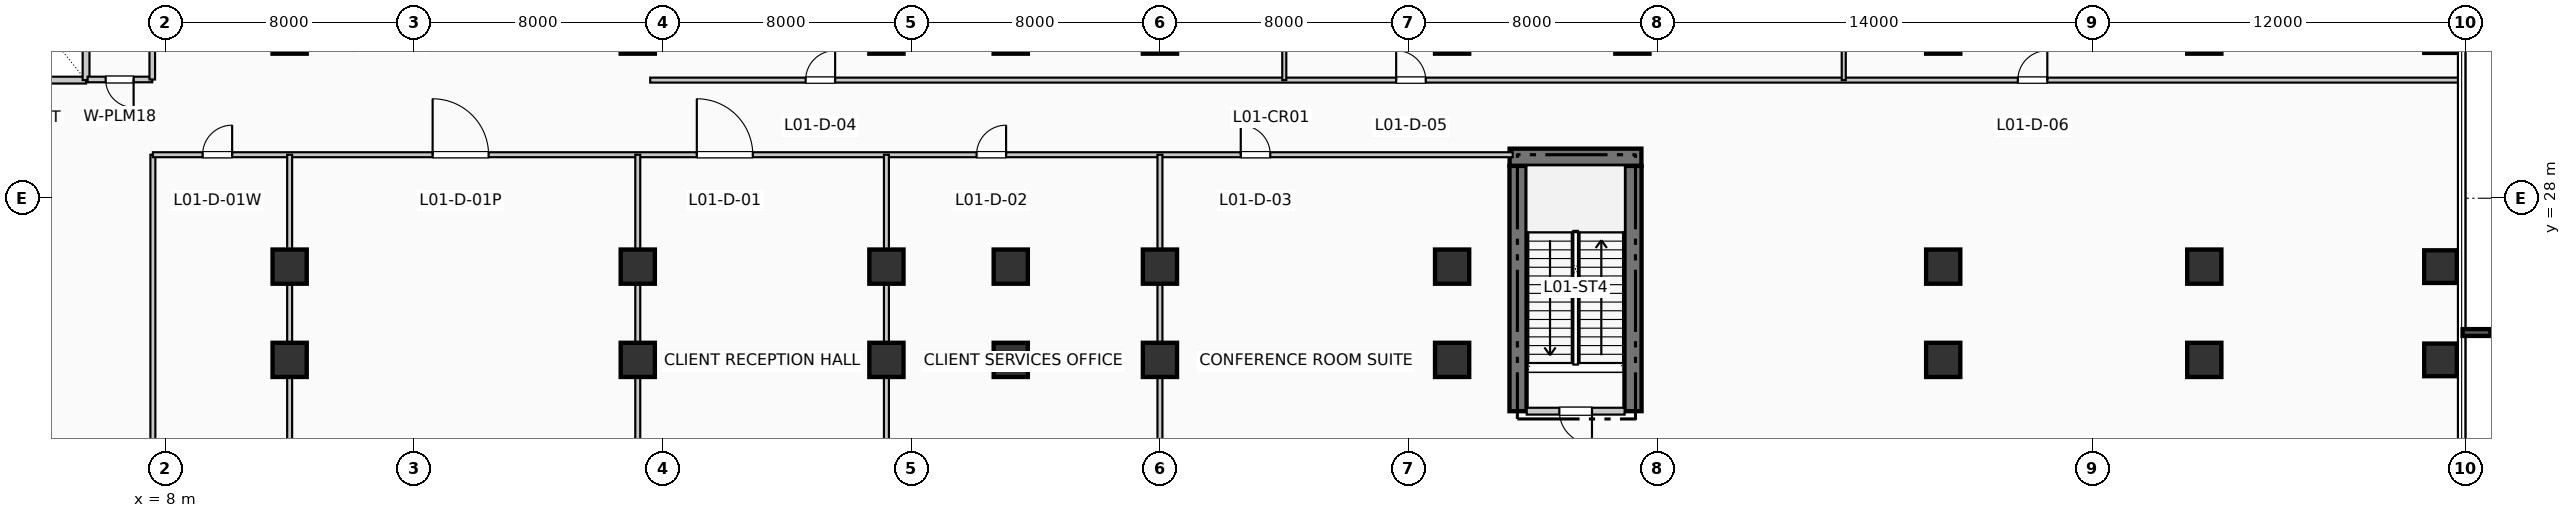
"""IFC4 building model, lengths in metres.
Left out: names, types, materials, properties, quantities, classifications, styles, units other than length and angle.
Written with IfcOpenShell. Run it as: python <this file> out.ifc"""

import sys

from ifc_helpers import new_model, si_unit, direction, frame, frame_2d, origin, origin_2d, place, context, subcontext, project, spatial, rectangle, extrude, element, fill, save


model = new_model("IFC4")
c1 = context("Model", 3, precision=1e-05, world=origin(), true_north=direction((0.0, 1.0)))
c2 = subcontext(c1, "Body", "Model", "MODEL_VIEW")
j1 = project(units=[si_unit("LENGTHUNIT", "METRE"), si_unit("PLANEANGLEUNIT", "RADIAN")], contexts=[c1])
p1 = place(None, origin())
s1 = spatial("IfcSite", under=j1, at=p1, CompositionType="ELEMENT")
p2 = place(p1, origin())
s2 = spatial("IfcBuilding", under=s1, at=p2, CompositionType="ELEMENT")
p3 = place(p2, frame((0.0, 0.0, 5.94)))
s3 = spatial("IfcBuildingStorey", under=s2, at=p3, CompositionType="ELEMENT", Elevation=5.94)
for number, where, z_axis, x_axis in (
    (1, (51.52, 21.15, 0.0), (0.0, 0.0, 1.0), (0.0, 1.0, 0.0)),
    (2, (55.22, 21.15, 0.0), (0.0, 0.0, 1.0), (0.0, 1.0, 0.0)),
):
    element("IfcWall", number, at=place(p3, frame(where, z_axis=z_axis, x_axis=x_axis)), inside=s3, PredefinedType="SHEAR", context=c2, shape_type="SweptSolid", body=[
        extrude(rectangle(XDim=7.89, YDim=0.55, at=frame_2d((3.945, 0.0))), origin(), (0.0, 0.0, 1.0), 5.28),
    ])
p4 = place(p3, frame((51.25, 29.32, 0.0), z_axis=(0.0, 0.0, 1.0), x_axis=(1.0, 0.0, 0.0)))
e3 = element("IfcWall", 3, at=p4, inside=s3, PredefinedType="SHEAR", context=c2, shape_type="SweptSolid", body=[
    extrude(rectangle(XDim=4.24, YDim=0.55, at=frame_2d((2.12, 0.0))), origin(), (0.0, 0.0, 1.0), 5.28),
])
for number, where, z_axis, x_axis in (
    (4, (12.0, 22.8, 0.0), (0.0, 0.0, 1.0), (1.0, 0.0, 0.0)),
    (5, (12.0, 25.8, 0.0), (0.0, 0.0, 1.0), (1.0, 0.0, 0.0)),
    (6, (12.0, 33.2, 0.0), (0.0, 0.0, 1.0), (1.0, 0.0, 0.0)),
    (7, (23.2, 22.8, 0.0), (0.0, 0.0, 1.0), (1.0, 0.0, 0.0)),
    (8, (23.2, 25.8, 0.0), (0.0, 0.0, 1.0), (1.0, 0.0, 0.0)),
    (9, (23.2, 33.2, 0.0), (0.0, 0.0, 1.0), (1.0, 0.0, 0.0)),
    (10, (31.2, 22.8, 0.0), (0.0, 0.0, 1.0), (1.0, 0.0, 0.0)),
    (11, (31.2, 25.8, 0.0), (0.0, 0.0, 1.0), (1.0, 0.0, 0.0)),
    (12, (31.2, 33.2, 0.0), (0.0, 0.0, 1.0), (1.0, 0.0, 0.0)),
    (13, (35.2, 22.8, 0.0), (0.0, 0.0, 1.0), (1.0, 0.0, 0.0)),
    (14, (35.2, 25.8, 0.0), (0.0, 0.0, 1.0), (1.0, 0.0, 0.0)),
    (15, (35.2, 33.2, 0.0), (0.0, 0.0, 1.0), (1.0, 0.0, 0.0)),
    (16, (40.0, 22.8, 0.0), (0.0, 0.0, 1.0), (1.0, 0.0, 0.0)),
    (17, (40.0, 25.8, 0.0), (0.0, 0.0, 1.0), (1.0, 0.0, 0.0)),
    (18, (40.0, 33.2, 0.0), (0.0, 0.0, 1.0), (1.0, 0.0, 0.0)),
    (19, (49.4, 22.8, 0.0), (0.0, 0.0, 1.0), (1.0, 0.0, 0.0)),
    (20, (49.4, 25.8, 0.0), (0.0, 0.0, 1.0), (1.0, 0.0, 0.0)),
    (21, (49.4, 33.2, 0.0), (0.0, 0.0, 1.0), (1.0, 0.0, 0.0)),
    (22, (55.2, 33.2, 0.0), (0.0, 0.0, 1.0), (1.0, 0.0, 0.0)),
    (23, (65.2, 22.8, 0.0), (0.0, 0.0, 1.0), (1.0, 0.0, 0.0)),
    (24, (65.2, 25.8, 0.0), (0.0, 0.0, 1.0), (1.0, 0.0, 0.0)),
    (25, (65.2, 33.2, 0.0), (0.0, 0.0, 1.0), (1.0, 0.0, 0.0)),
    (26, (73.6, 22.8, 0.0), (0.0, 0.0, 1.0), (1.0, 0.0, 0.0)),
    (27, (73.6, 25.8, 0.0), (0.0, 0.0, 1.0), (1.0, 0.0, 0.0)),
    (28, (73.6, 33.2, 0.0), (0.0, 0.0, 1.0), (1.0, 0.0, 0.0)),
):
    element("IfcColumn", number, at=place(p3, frame(where, z_axis=z_axis, x_axis=x_axis)), inside=s3, PredefinedType="COLUMN", context=c2, shape_type="SweptSolid", body=[
        extrude(rectangle(XDim=1.1, YDim=1.1, at=origin_2d()), origin(), (0.0, 0.0, 1.0), 5.28),
    ])
for number, where, z_axis, x_axis in (
    (29, (81.2, 22.8, 0.0), (0.0, 0.0, 1.0), (1.0, 0.0, 0.0)),
    (30, (81.2, 25.8, 0.0), (0.0, 0.0, 1.0), (1.0, 0.0, 0.0)),
    (31, (81.2, 33.2, 0.0), (0.0, 0.0, 1.0), (1.0, 0.0, 0.0)),
):
    element("IfcColumn", number, at=place(p3, frame(where, z_axis=z_axis, x_axis=x_axis)), inside=s3, PredefinedType="COLUMN", context=c2, shape_type="SweptSolid", body=[
        extrude(rectangle(XDim=1.05, YDim=1.05, at=origin_2d()), origin(), (0.0, 0.0, 1.0), 5.28),
    ])
p5 = place(p3, frame((1.55, 31.8, 0.0), z_axis=(0.0, 0.0, 1.0), x_axis=(1.0, 0.0, 0.0)))
e32 = element("IfcWall", 32, at=p5, inside=s3, PredefinedType="PARTITIONING", context=c2, shape_type="SweptSolid", body=[
    extrude(rectangle(XDim=3.9, YDim=0.22, at=frame_2d((1.95, 0.0))), origin(), (0.0, 0.0, 1.0), 4.96),
])
p6 = place(p3, frame((5.45, 31.8, 0.0), z_axis=(0.0, 0.0, 1.0), x_axis=(0.0, 1.0, 0.0)))
e33 = element("IfcWall", 33, at=p6, inside=s3, PredefinedType="PARTITIONING", context=c2, shape_type="SweptSolid", body=[
    extrude(rectangle(XDim=2.38, YDim=0.22, at=frame_2d((1.19, 0.0))), origin(), (0.0, 0.0, 1.0), 4.96),
])
p7 = place(p3, frame((5.5, 31.82, 0.0), z_axis=(0.0, 0.0, 1.0), x_axis=(1.0, 0.0, 0.0)))
e34 = element("IfcWall", 34, at=p7, inside=s3, PredefinedType="PLUMBINGWALL", context=c2, shape_type="SweptSolid", body=[
    extrude(rectangle(XDim=2.08, YDim=0.18, at=frame_2d((1.04, 0.0))), origin(), (0.0, 0.0, 1.0), 4.96),
])
p8 = place(p7, frame((1.48, 0.0, 0.0), z_axis=(0.0, 0.0, 1.0), x_axis=(-1.0, 0.0, 0.0)))
e35 = element("IfcOpeningElement", 35, at=p8, cuts=e34, PredefinedType="OPENING", context=c2, shape_type="SweptSolid", body=[
    extrude(rectangle(XDim=0.9, YDim=2.1, at=frame_2d((0.45, 1.05))), frame((0.0, 0.1, 0.0), z_axis=(0.0, -1.0, 0.0), x_axis=(1.0, 0.0, 0.0)), (0.0, 0.0, 1.0), 0.2),
])
p9 = place(p3, frame((7.58, 31.82, 0.0), z_axis=(0.0, 0.0, 1.0), x_axis=(0.0, 1.0, 0.0)))
e36 = element("IfcWall", 36, at=p9, inside=s3, PredefinedType="PLUMBINGWALL", context=c2, shape_type="SweptSolid", body=[
    extrude(rectangle(XDim=2.36, YDim=0.18, at=frame_2d((1.18, 0.0))), origin(), (0.0, 0.0, 1.0), 4.96),
])
p10 = place(p3, frame((51.8, 21.15, 0.0), z_axis=(0.0, 0.0, 1.0), x_axis=(1.0, 0.0, 0.0)))
e37 = element("IfcWall", 37, at=p10, inside=s3, PredefinedType="PARTITIONING", context=c2, shape_type="SweptSolid", body=[
    extrude(rectangle(XDim=3.15, YDim=0.22, at=frame_2d((1.575, 0.0))), origin(), (0.0, 0.0, 1.0), 4.96),
])
p11 = place(p10, frame((2.1, 0.0, 0.0), z_axis=(0.0, 0.0, 1.0), x_axis=(-1.0, 0.0, 0.0)))
e38 = element("IfcOpeningElement", 38, at=p11, cuts=e37, PredefinedType="OPENING", context=c2, shape_type="SweptSolid", body=[
    extrude(rectangle(XDim=1.05, YDim=2.15, at=frame_2d((0.525, 1.075))), frame((0.0, 0.12, 0.0), z_axis=(0.0, -1.0, 0.0), x_axis=(1.0, 0.0, 0.0)), (0.0, 0.0, 1.0), 0.24),
])
p12 = place(p3, frame((7.6, -1.81, 0.0), z_axis=(0.0, 0.0, 1.0), x_axis=(0.0, 1.0, 0.0)))
e39 = element("IfcWall", 39, at=p12, inside=s3, PredefinedType="PARTITIONING", context=c2, shape_type="SweptSolid", body=[
    extrude(rectangle(XDim=31.21, YDim=0.16, at=frame_2d((15.605, 0.0))), origin(), (0.0, 0.0, 1.0), 3.895),
])
p13 = place(p3, frame((7.6, 29.4, 0.0), z_axis=(0.0, 0.0, 1.0), x_axis=(1.0, 0.0, 0.0)))
e40 = element("IfcWall", 40, at=p13, inside=s3, PredefinedType="PARTITIONING", context=c2, shape_type="SweptSolid", body=[
    extrude(rectangle(XDim=43.75, YDim=0.16, at=frame_2d((21.875, 0.0))), origin(), (0.0, 0.0, 1.0), 4.615),
])
p14 = place(p13, frame((17.5, 0.0, 0.0)))
e41 = element("IfcOpeningElement", 41, at=p14, cuts=e40, PredefinedType="OPENING", context=c2, shape_type="SweptSolid", body=[
    extrude(rectangle(XDim=1.8, YDim=2.3, at=frame_2d((0.9, 1.15))), frame((0.0, 0.09, 0.0), z_axis=(0.0, -1.0, 0.0), x_axis=(1.0, 0.0, 0.0)), (0.0, 0.0, 1.0), 0.18),
])
p15 = place(p13, frame((1.6, 0.0, 0.0)))
e42 = element("IfcOpeningElement", 42, at=p15, cuts=e40, PredefinedType="OPENING", context=c2, shape_type="SweptSolid", body=[
    extrude(rectangle(XDim=0.95, YDim=2.15, at=frame_2d((0.475, 1.075))), frame((0.0, 0.09, 0.0), z_axis=(0.0, -1.0, 0.0), x_axis=(1.0, 0.0, 0.0)), (0.0, 0.0, 1.0), 0.18),
])
p16 = place(p13, frame((9.0, 0.0, 0.0)))
e43 = element("IfcOpeningElement", 43, at=p16, cuts=e40, PredefinedType="OPENING", context=c2, shape_type="SweptSolid", body=[
    extrude(rectangle(XDim=1.8, YDim=2.3, at=frame_2d((0.9, 1.15))), frame((0.0, 0.09, 0.0), z_axis=(0.0, -1.0, 0.0), x_axis=(1.0, 0.0, 0.0)), (0.0, 0.0, 1.0), 0.18),
])
p17 = place(p13, frame((26.5, 0.0, 0.0)))
e44 = element("IfcOpeningElement", 44, at=p17, cuts=e40, PredefinedType="OPENING", context=c2, shape_type="SweptSolid", body=[
    extrude(rectangle(XDim=0.95, YDim=2.15, at=frame_2d((0.475, 1.075))), frame((0.0, 0.09, 0.0), z_axis=(0.0, -1.0, 0.0), x_axis=(1.0, 0.0, 0.0)), (0.0, 0.0, 1.0), 0.18),
])
p18 = place(p13, frame((35.0, 0.0, 0.0)))
e45 = element("IfcOpeningElement", 45, at=p18, cuts=e40, PredefinedType="OPENING", context=c2, shape_type="SweptSolid", body=[
    extrude(rectangle(XDim=0.95, YDim=2.15, at=frame_2d((0.475, 1.075))), frame((0.0, 0.09, 0.0), z_axis=(0.0, -1.0, 0.0), x_axis=(1.0, 0.0, 0.0)), (0.0, 0.0, 1.0), 0.18),
])
for number, where, z_axis, x_axis in (
    (46, (12.0, -1.81, 0.0), (0.0, 0.0, 1.0), (0.0, 1.0, 0.0)),
    (47, (23.2, -1.81, 0.0), (0.0, 0.0, 1.0), (0.0, 1.0, 0.0)),
):
    element("IfcWall", number, at=place(p3, frame(where, z_axis=z_axis, x_axis=x_axis)), inside=s3, PredefinedType="PARTITIONING", context=c2, shape_type="SweptSolid", body=[
        extrude(rectangle(XDim=31.21, YDim=0.16, at=frame_2d((15.605, 0.0))), origin(), (0.0, 0.0, 1.0), 4.145),
    ])
for number, where, z_axis, x_axis in (
    (48, (31.2, 16.19, 0.0), (0.0, 0.0, 1.0), (0.0, 1.0, 0.0)),
    (49, (40.0, 16.19, 0.0), (0.0, 0.0, 1.0), (0.0, 1.0, 0.0)),
):
    element("IfcWall", number, at=place(p3, frame(where, z_axis=z_axis, x_axis=x_axis)), inside=s3, PredefinedType="PARTITIONING", context=c2, shape_type="SweptSolid", body=[
        extrude(rectangle(XDim=13.21, YDim=0.16, at=frame_2d((6.605, 0.0))), origin(), (0.0, 0.0, 1.0), 4.145),
    ])
p19 = place(p3, frame((23.6, 31.8, 0.0), z_axis=(0.0, 0.0, 1.0), x_axis=(1.0, 0.0, 0.0)))
e50 = element("IfcWall", 50, at=p19, inside=s3, PredefinedType="PARTITIONING", context=c2, shape_type="SweptSolid", body=[
    extrude(rectangle(XDim=58.21, YDim=0.16, at=frame_2d((29.105, 0.0))), origin(), (0.0, 0.0, 1.0), 4.96),
])
p20 = place(p19, frame((5.0, 0.0, 0.0)))
e51 = element("IfcOpeningElement", 51, at=p20, cuts=e50, PredefinedType="OPENING", context=c2, shape_type="SweptSolid", body=[
    extrude(rectangle(XDim=0.95, YDim=2.15, at=frame_2d((0.475, 1.075))), frame((0.0, 0.09, 0.0), z_axis=(0.0, -1.0, 0.0), x_axis=(1.0, 0.0, 0.0)), (0.0, 0.0, 1.0), 0.18),
])
p21 = place(p19, frame((24.0, 0.0, 0.0)))
e52 = element("IfcOpeningElement", 52, at=p21, cuts=e50, PredefinedType="OPENING", context=c2, shape_type="SweptSolid", body=[
    extrude(rectangle(XDim=0.95, YDim=2.15, at=frame_2d((0.475, 1.075))), frame((0.0, 0.09, 0.0), z_axis=(0.0, -1.0, 0.0), x_axis=(1.0, 0.0, 0.0)), (0.0, 0.0, 1.0), 0.18),
])
p22 = place(p19, frame((44.0, 0.0, 0.0)))
e53 = element("IfcOpeningElement", 53, at=p22, cuts=e50, PredefinedType="OPENING", context=c2, shape_type="SweptSolid", body=[
    extrude(rectangle(XDim=0.95, YDim=2.15, at=frame_2d((0.475, 1.075))), frame((0.0, 0.09, 0.0), z_axis=(0.0, -1.0, 0.0), x_axis=(1.0, 0.0, 0.0)), (0.0, 0.0, 1.0), 0.18),
])
for number, where, z_axis, x_axis in (
    (54, (44.0, 31.8, 0.0), (0.0, 0.0, 1.0), (0.0, 1.0, 0.0)),
    (55, (62.0, 31.8, 0.0), (0.0, 0.0, 1.0), (0.0, 1.0, 0.0)),
):
    element("IfcWall", number, at=place(p3, frame(where, z_axis=z_axis, x_axis=x_axis)), inside=s3, PredefinedType="PARTITIONING", context=c2, shape_type="SweptSolid", body=[
        extrude(rectangle(XDim=16.01, YDim=0.13, at=frame_2d((8.005, 0.0))), origin(), (0.0, 0.0, 1.0), 4.96),
    ])
p23 = place(p8, origin())
e56 = element("IfcDoor", 56, at=p23, inside=s3, OperationType="SINGLE_SWING_RIGHT", PredefinedType="DOOR", context=c2, shape_type="SweptSolid", body=[
    extrude(rectangle(XDim=0.9, YDim=2.1, at=frame_2d((0.45, 1.05))), frame((0.0, 0.025, 0.0), z_axis=(0.0, -1.0, 0.0), x_axis=(1.0, 0.0, 0.0)), (0.0, 0.0, 1.0), 0.05),
])
fill(e35, e56)
p24 = place(p11, origin())
e57 = element("IfcDoor", 57, at=p24, inside=s3, OperationType="SINGLE_SWING_RIGHT", PredefinedType="DOOR", context=c2, shape_type="SweptSolid", body=[
    extrude(rectangle(XDim=1.05, YDim=2.15, at=frame_2d((0.525, 1.075))), frame((0.0, 0.025, 0.0), z_axis=(0.0, -1.0, 0.0), x_axis=(1.0, 0.0, 0.0)), (0.0, 0.0, 1.0), 0.05),
])
fill(e38, e57)
p25 = place(p14, origin())
e58 = element("IfcDoor", 58, at=p25, inside=s3, OperationType="SINGLE_SWING_LEFT", PredefinedType="DOOR", context=c2, shape_type="SweptSolid", body=[
    extrude(rectangle(XDim=1.8, YDim=2.3, at=frame_2d((0.9, 1.15))), frame((0.0, 0.025, 0.0), z_axis=(0.0, -1.0, 0.0), x_axis=(1.0, 0.0, 0.0)), (0.0, 0.0, 1.0), 0.05),
])
fill(e41, e58)
p26 = place(p15, origin())
e59 = element("IfcDoor", 59, at=p26, inside=s3, OperationType="SINGLE_SWING_RIGHT", PredefinedType="DOOR", context=c2, shape_type="SweptSolid", body=[
    extrude(rectangle(XDim=0.95, YDim=2.15, at=frame_2d((0.475, 1.075))), frame((0.0, 0.025, 0.0), z_axis=(0.0, -1.0, 0.0), x_axis=(1.0, 0.0, 0.0)), (0.0, 0.0, 1.0), 0.05),
])
fill(e42, e59)
p27 = place(p16, origin())
e60 = element("IfcDoor", 60, at=p27, inside=s3, OperationType="SINGLE_SWING_LEFT", PredefinedType="DOOR", context=c2, shape_type="SweptSolid", body=[
    extrude(rectangle(XDim=1.8, YDim=2.3, at=frame_2d((0.9, 1.15))), frame((0.0, 0.025, 0.0), z_axis=(0.0, -1.0, 0.0), x_axis=(1.0, 0.0, 0.0)), (0.0, 0.0, 1.0), 0.05),
])
fill(e43, e60)
p28 = place(p17, origin())
e61 = element("IfcDoor", 61, at=p28, inside=s3, OperationType="SINGLE_SWING_RIGHT", PredefinedType="DOOR", context=c2, shape_type="SweptSolid", body=[
    extrude(rectangle(XDim=0.95, YDim=2.15, at=frame_2d((0.475, 1.075))), frame((0.0, 0.025, 0.0), z_axis=(0.0, -1.0, 0.0), x_axis=(1.0, 0.0, 0.0)), (0.0, 0.0, 1.0), 0.05),
])
fill(e44, e61)
p29 = place(p18, origin())
e62 = element("IfcDoor", 62, at=p29, inside=s3, OperationType="SINGLE_SWING_LEFT", PredefinedType="DOOR", context=c2, shape_type="SweptSolid", body=[
    extrude(rectangle(XDim=0.95, YDim=2.15, at=frame_2d((0.475, 1.075))), frame((0.0, 0.025, 0.0), z_axis=(0.0, -1.0, 0.0), x_axis=(1.0, 0.0, 0.0)), (0.0, 0.0, 1.0), 0.05),
])
fill(e45, e62)
p30 = place(p20, origin())
e63 = element("IfcDoor", 63, at=p30, inside=s3, OperationType="SINGLE_SWING_RIGHT", PredefinedType="DOOR", context=c2, shape_type="SweptSolid", body=[
    extrude(rectangle(XDim=0.95, YDim=2.15, at=frame_2d((0.475, 1.075))), frame((0.0, 0.025, 0.0), z_axis=(0.0, -1.0, 0.0), x_axis=(1.0, 0.0, 0.0)), (0.0, 0.0, 1.0), 0.05),
])
fill(e51, e63)
p31 = place(p21, origin())
e64 = element("IfcDoor", 64, at=p31, inside=s3, OperationType="SINGLE_SWING_LEFT", PredefinedType="DOOR", context=c2, shape_type="SweptSolid", body=[
    extrude(rectangle(XDim=0.95, YDim=2.15, at=frame_2d((0.475, 1.075))), frame((0.0, 0.025, 0.0), z_axis=(0.0, -1.0, 0.0), x_axis=(1.0, 0.0, 0.0)), (0.0, 0.0, 1.0), 0.05),
])
fill(e52, e64)
p32 = place(p22, origin())
e65 = element("IfcDoor", 65, at=p32, inside=s3, OperationType="SINGLE_SWING_RIGHT", PredefinedType="DOOR", context=c2, shape_type="SweptSolid", body=[
    extrude(rectangle(XDim=0.95, YDim=2.15, at=frame_2d((0.475, 1.075))), frame((0.0, 0.025, 0.0), z_axis=(0.0, -1.0, 0.0), x_axis=(1.0, 0.0, 0.0)), (0.0, 0.0, 1.0), 0.05),
])
fill(e53, e65)
save(model, sys.argv[1])
